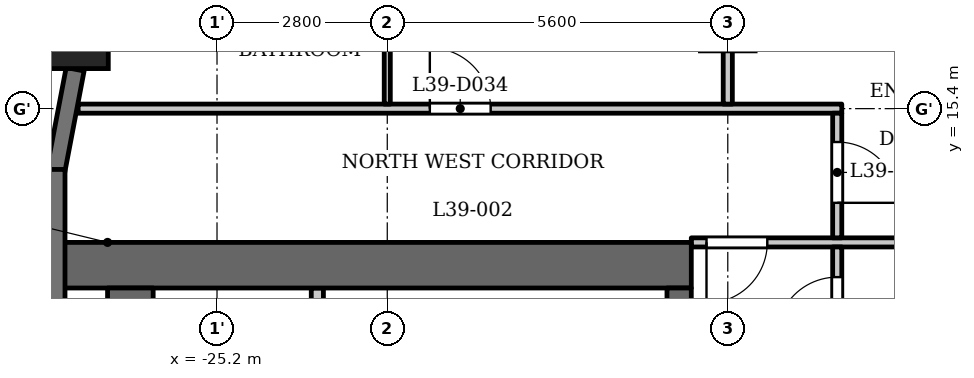
"""IFC4 building model, lengths in metres.
Left out: names, types, materials, properties, quantities, classifications, styles, units other than length and angle.
Written with IfcOpenShell. Run it as: python <this file> out.ifc"""

import sys

from ifc_helpers import new_model, si_unit, direction, frame, frame_2d, origin, origin_2d, place, context, subcontext, project, spatial, rectangle, extrude, element, fill, save


model = new_model("IFC4")
c1 = context("Model", 3, precision=1e-05, world=origin(), true_north=direction((0.0, 1.0)))
c2 = subcontext(c1, "Body", "Model", "MODEL_VIEW")
j1 = project(units=[si_unit("LENGTHUNIT", "METRE"), si_unit("PLANEANGLEUNIT", "RADIAN")], contexts=[c1])
p1 = place(None, origin())
s1 = spatial("IfcSite", under=j1, at=p1, CompositionType="ELEMENT")
p2 = place(p1, origin())
s2 = spatial("IfcBuilding", under=s1, at=p2, CompositionType="ELEMENT")
p3 = place(p2, frame((0.0, 0.0, 153.6)))
s3 = spatial("IfcBuildingStorey", under=s2, at=p3, CompositionType="ELEMENT", Elevation=153.6)
p4 = place(p3, frame((-27.538, 16.609, 0.0), z_axis=(0.0, 0.0, 1.0), x_axis=(1.0, 0.0, 0.0)))
e1 = element("IfcColumn", 1, at=p4, inside=s3, PredefinedType="COLUMN", context=c2, shape_type="SweptSolid", body=[
    extrude(rectangle(XDim=1.1, YDim=1.1, at=origin_2d()), origin(), (0.0, 0.0, 1.0), 3.5),
])
p5 = place(p3, frame((-27.533, 16.048, 0.0), z_axis=(0.0, 0.0, 1.0), x_axis=(-0.187302784601, -0.982302227871, 0.0)))
e2 = element("IfcWall", 2, at=p5, inside=s3, PredefinedType="SOLIDWALL", context=c2, shape_type="SweptSolid", body=[
    extrude(rectangle(XDim=1.706, YDim=0.3, at=frame_2d((0.853, 0.0))), origin(), (0.0, 0.0, 1.0), 2.45),
])
p6 = place(p3, frame((-27.85, 14.4, 0.0), z_axis=(0.0, 0.0, 1.0), x_axis=(0.0, -1.0, 0.0)))
e3 = element("IfcWall", 3, at=p6, inside=s3, PredefinedType="SOLIDWALL", context=c2, shape_type="SweptSolid", body=[
    extrude(rectangle(XDim=2.65, YDim=0.3, at=frame_2d((1.325, 0.0))), origin(), (0.0, 0.0, 1.0), 2.45),
])
p7 = place(p3, frame((-17.4, 12.825, 0.0), z_axis=(0.0, 0.0, 1.0), x_axis=(-1.0, 0.0, 0.0)))
e4 = element("IfcWall", 4, at=p7, inside=s3, PredefinedType="SHEAR", context=c2, shape_type="SweptSolid", body=[
    extrude(rectangle(XDim=10.4, YDim=0.75, at=frame_2d((5.2, 0.0))), origin(), (0.0, 0.0, 1.0), 3.2),
])
p8 = place(p3, frame((-17.6, -12.45, 0.0), z_axis=(0.0, 0.0, 1.0), x_axis=(0.0, 1.0, 0.0)))
e5 = element("IfcWall", 5, at=p8, inside=s3, PredefinedType="SHEAR", context=c2, shape_type="SweptSolid", body=[
    extrude(rectangle(XDim=24.9, YDim=0.4, at=frame_2d((12.45, 0.0))), origin(), (0.0, 0.0, 1.0), 3.2),
])
p9 = place(p8, frame((6.325, 0.0, 0.0)))
e6 = element("IfcOpeningElement", 6, at=p9, cuts=e5, PredefinedType="OPENING", context=c2, shape_type="SweptSolid", body=[
    extrude(rectangle(XDim=0.9, YDim=2.1, at=frame_2d((0.45, 1.05))), frame((0.0, 0.21, 0.0), z_axis=(0.0, -1.0, 0.0), x_axis=(1.0, 0.0, 0.0)), (0.0, 0.0, 1.0), 0.42),
])
p10 = place(p8, frame((9.925, 0.0, 0.0)))
e7 = element("IfcOpeningElement", 7, at=p10, cuts=e5, PredefinedType="OPENING", context=c2, shape_type="SweptSolid", body=[
    extrude(rectangle(XDim=0.9, YDim=2.1, at=frame_2d((0.45, 1.05))), frame((0.0, 0.21, 0.0), z_axis=(0.0, -1.0, 0.0), x_axis=(1.0, 0.0, 0.0)), (0.0, 0.0, 1.0), 0.42),
])
p11 = place(p8, frame((15.6, 0.0, 0.0)))
e8 = element("IfcOpeningElement", 8, at=p11, cuts=e5, PredefinedType="OPENING", context=c2, shape_type="SweptSolid", body=[
    extrude(rectangle(XDim=1.1, YDim=2.1, at=frame_2d((0.55, 1.05))), frame((0.0, 0.21, 0.0), z_axis=(0.0, -1.0, 0.0), x_axis=(1.0, 0.0, 0.0)), (0.0, 0.0, 1.0), 0.42),
])
p12 = place(p8, frame((18.0, 0.0, 0.0)))
e9 = element("IfcOpeningElement", 9, at=p12, cuts=e5, PredefinedType="OPENING", context=c2, shape_type="SweptSolid", body=[
    extrude(rectangle(XDim=1.1, YDim=2.1, at=frame_2d((0.55, 1.05))), frame((0.0, 0.21, 0.0), z_axis=(0.0, -1.0, 0.0), x_axis=(1.0, 0.0, 0.0)), (0.0, 0.0, 1.0), 0.42),
])
p13 = place(p8, frame((23.025, 0.0, 0.0)))
e10 = element("IfcOpeningElement", 10, at=p13, cuts=e5, PredefinedType="OPENING", context=c2, shape_type="SweptSolid", body=[
    extrude(rectangle(XDim=1.1, YDim=2.1, at=frame_2d((0.55, 1.05))), frame((0.0, 0.21, 0.0), z_axis=(0.0, -1.0, 0.0), x_axis=(1.0, 0.0, 0.0)), (0.0, 0.0, 1.0), 0.42),
])
p14 = place(p8, frame((0.775, 0.0, 0.0)))
e11 = element("IfcOpeningElement", 11, at=p14, cuts=e5, PredefinedType="OPENING", context=c2, shape_type="SweptSolid", body=[
    extrude(rectangle(XDim=1.1, YDim=2.1, at=frame_2d((0.55, 1.05))), frame((0.0, 0.21, 0.0), z_axis=(0.0, -1.0, 0.0), x_axis=(1.0, 0.0, 0.0)), (0.0, 0.0, 1.0), 0.42),
])
p15 = place(p8, frame((12.925, 0.0, 0.0)))
e12 = element("IfcOpeningElement", 12, at=p15, cuts=e5, PredefinedType="OPENING", context=c2, shape_type="SweptSolid", body=[
    extrude(rectangle(XDim=1.8, YDim=2.1, at=frame_2d((0.9, 1.05))), frame((0.0, 0.21, 0.0), z_axis=(0.0, -1.0, 0.0), x_axis=(1.0, 0.0, 0.0)), (0.0, 0.0, 1.0), 0.42),
])
p16 = place(p3, frame((-26.625, -12.45, 0.0), z_axis=(0.0, 0.0, 1.0), x_axis=(0.0, 1.0, 0.0)))
e13 = element("IfcWall", 13, at=p16, inside=s3, PredefinedType="SHEAR", context=c2, shape_type="SweptSolid", body=[
    extrude(rectangle(XDim=24.9, YDim=0.75, at=frame_2d((12.45, 0.0))), origin(), (0.0, 0.0, 1.0), 3.2),
])
p17 = place(p3, frame((-23.55, 9.8, 0.0), z_axis=(0.0, 0.0, 1.0), x_axis=(0.0, 1.0, 0.0)))
e14 = element("IfcWall", 14, at=p17, inside=s3, PredefinedType="PARTITIONING", context=c2, shape_type="SweptSolid", body=[
    extrude(rectangle(XDim=2.65, YDim=0.2, at=frame_2d((1.325, 0.0))), origin(), (0.0, 0.0, 1.0), 3.2),
])
p18 = place(p17, frame((0.875, 0.0, 0.0)))
e15 = element("IfcOpeningElement", 15, at=p18, cuts=e14, PredefinedType="OPENING", context=c2, shape_type="SweptSolid", body=[
    extrude(rectangle(XDim=0.9, YDim=2.1, at=frame_2d((0.45, 1.05))), frame((0.0, 0.11, 0.0), z_axis=(0.0, -1.0, 0.0), x_axis=(1.0, 0.0, 0.0)), (0.0, 0.0, 1.0), 0.22),
])
p19 = place(p3, frame((-17.4, 13.2, 0.0), z_axis=(0.0, 0.0, 1.0), x_axis=(1.0, 0.0, 0.0)))
e16 = element("IfcWall", 16, at=p19, inside=s3, PredefinedType="PARTITIONING", context=c2, shape_type="SweptSolid", body=[
    extrude(rectangle(XDim=34.8, YDim=0.15, at=frame_2d((17.4, 0.0))), origin(), (0.0, 0.0, 1.0), 3.2),
])
p20 = place(p19, frame((0.25, 0.0, 0.0)))
e17 = element("IfcOpeningElement", 17, at=p20, cuts=e16, PredefinedType="OPENING", context=c2, shape_type="SweptSolid", body=[
    extrude(rectangle(XDim=1.0, YDim=2.1, at=frame_2d((0.5, 1.05))), frame((0.0, 0.085, 0.0), z_axis=(0.0, -1.0, 0.0), x_axis=(1.0, 0.0, 0.0)), (0.0, 0.0, 1.0), 0.17),
])
p21 = place(p19, frame((33.65, 0.0, 0.0)))
e18 = element("IfcOpeningElement", 18, at=p21, cuts=e16, PredefinedType="OPENING", context=c2, shape_type="SweptSolid", body=[
    extrude(rectangle(XDim=1.0, YDim=2.1, at=frame_2d((0.5, 1.05))), frame((0.0, 0.085, 0.0), z_axis=(0.0, -1.0, 0.0), x_axis=(1.0, 0.0, 0.0)), (0.0, 0.0, 1.0), 0.17),
])
p22 = place(p19, frame((13.75, 0.0, 0.0)))
e19 = element("IfcOpeningElement", 19, at=p22, cuts=e16, PredefinedType="OPENING", context=c2, shape_type="SweptSolid", body=[
    extrude(rectangle(XDim=1.0, YDim=2.1, at=frame_2d((0.5, 1.05))), frame((0.0, 0.085, 0.0), z_axis=(0.0, -1.0, 0.0), x_axis=(1.0, 0.0, 0.0)), (0.0, 0.0, 1.0), 0.17),
])
p23 = place(p3, frame((-27.484, 15.4, 0.0), z_axis=(0.0, 0.0, 1.0), x_axis=(1.0, 0.0, 0.0)))
e20 = element("IfcWall", 20, at=p23, inside=s3, PredefinedType="PARTITIONING", context=c2, shape_type="SweptSolid", body=[
    extrude(rectangle(XDim=12.559, YDim=0.15, at=frame_2d((6.279, 0.0))), origin(), (0.0, 0.0, 1.0), 3.2),
])
p24 = place(p23, frame((5.784, 0.0, 0.0)))
e21 = element("IfcOpeningElement", 21, at=p24, cuts=e20, PredefinedType="OPENING", context=c2, shape_type="SweptSolid", body=[
    extrude(rectangle(XDim=1.0, YDim=2.1, at=frame_2d((0.5, 1.05))), frame((0.0, 0.085, 0.0), z_axis=(0.0, -1.0, 0.0), x_axis=(1.0, 0.0, 0.0)), (0.0, 0.0, 1.0), 0.17),
])
p25 = place(p3, frame((-22.4, 15.475, 0.0), z_axis=(0.0, 0.0, 1.0), x_axis=(0.0, 1.0, 0.0)))
e22 = element("IfcWall", 22, at=p25, inside=s3, PredefinedType="PARTITIONING", context=c2, shape_type="SweptSolid", body=[
    extrude(rectangle(XDim=2.575, YDim=0.1, at=frame_2d((1.288, 0.0))), origin(), (0.0, 0.0, 1.0), 3.2),
])
p26 = place(p3, frame((-16.8, 15.475, 0.0), z_axis=(0.0, 0.0, 1.0), x_axis=(0.0, 1.0, 0.0)))
e23 = element("IfcWall", 23, at=p26, inside=s3, PredefinedType="PARTITIONING", context=c2, shape_type="SweptSolid", body=[
    extrude(rectangle(XDim=7.455, YDim=0.15, at=frame_2d((3.728, 0.0))), origin(), (0.0, 0.0, 1.0), 3.2),
])
p27 = place(p3, frame((-15.0, 6.769, 0.0), z_axis=(0.0, 0.0, 1.0), x_axis=(0.0, 1.0, 0.0)))
e24 = element("IfcWall", 24, at=p27, inside=s3, PredefinedType="PARTITIONING", context=c2, shape_type="SweptSolid", body=[
    extrude(rectangle(XDim=6.356, YDim=0.15, at=frame_2d((3.178, 0.0))), origin(), (0.0, 0.0, 1.0), 3.2),
])
p28 = place(p27, frame((4.86, 0.0, 0.0)))
e25 = element("IfcOpeningElement", 25, at=p28, cuts=e24, PredefinedType="OPENING", context=c2, shape_type="SweptSolid", body=[
    extrude(rectangle(XDim=1.0, YDim=2.1, at=frame_2d((0.5, 1.05))), frame((0.0, 0.085, 0.0), z_axis=(0.0, -1.0, 0.0), x_axis=(1.0, 0.0, 0.0)), (0.0, 0.0, 1.0), 0.17),
])
p29 = place(p3, frame((-15.0, 13.275, 0.0), z_axis=(0.0, 0.0, 1.0), x_axis=(0.0, 1.0, 0.0)))
e26 = element("IfcWall", 26, at=p29, inside=s3, PredefinedType="PARTITIONING", context=c2, shape_type="SweptSolid", body=[
    extrude(rectangle(XDim=2.05, YDim=0.15, at=frame_2d((1.025, 0.0))), origin(), (0.0, 0.0, 1.0), 3.2),
])
p30 = place(p29, frame((0.576, 0.0, 0.0)))
e27 = element("IfcOpeningElement", 27, at=p30, cuts=e26, PredefinedType="OPENING", context=c2, shape_type="SweptSolid", body=[
    extrude(rectangle(XDim=1.0, YDim=2.1, at=frame_2d((0.5, 1.05))), frame((0.0, 0.085, 0.0), z_axis=(0.0, -1.0, 0.0), x_axis=(1.0, 0.0, 0.0)), (0.0, 0.0, 1.0), 0.17),
])
p31 = place(p28, origin())
e28 = element("IfcDoor", 28, at=p31, inside=s3, OperationType="SINGLE_SWING_RIGHT", PredefinedType="DOOR", context=c2, shape_type="SweptSolid", body=[
    extrude(rectangle(XDim=1.0, YDim=2.1, at=frame_2d((0.5, 1.05))), frame((0.0, 0.025, 0.0), z_axis=(0.0, -1.0, 0.0), x_axis=(1.0, 0.0, 0.0)), (0.0, 0.0, 1.0), 0.05),
])
fill(e25, e28)
p32 = place(p20, origin())
e29 = element("IfcDoor", 29, at=p32, inside=s3, OperationType="SINGLE_SWING_LEFT", PredefinedType="DOOR", context=c2, shape_type="SweptSolid", body=[
    extrude(rectangle(XDim=1.0, YDim=2.1, at=frame_2d((0.5, 1.05))), frame((0.0, 0.025, 0.0), z_axis=(0.0, -1.0, 0.0), x_axis=(1.0, 0.0, 0.0)), (0.0, 0.0, 1.0), 0.05),
])
fill(e17, e29)
p33 = place(p30, origin())
e30 = element("IfcDoor", 30, at=p33, inside=s3, OperationType="SINGLE_SWING_LEFT", PredefinedType="DOOR", context=c2, shape_type="SweptSolid", body=[
    extrude(rectangle(XDim=1.0, YDim=2.1, at=frame_2d((0.5, 1.05))), frame((0.0, 0.025, 0.0), z_axis=(0.0, -1.0, 0.0), x_axis=(1.0, 0.0, 0.0)), (0.0, 0.0, 1.0), 0.05),
])
fill(e27, e30)
p34 = place(p24, origin())
e31 = element("IfcDoor", 31, at=p34, inside=s3, OperationType="SINGLE_SWING_RIGHT", PredefinedType="DOOR", context=c2, shape_type="SweptSolid", body=[
    extrude(rectangle(XDim=1.0, YDim=2.1, at=frame_2d((0.5, 1.05))), frame((0.0, 0.025, 0.0), z_axis=(0.0, -1.0, 0.0), x_axis=(1.0, 0.0, 0.0)), (0.0, 0.0, 1.0), 0.05),
])
fill(e21, e31)
save(model, sys.argv[1])
